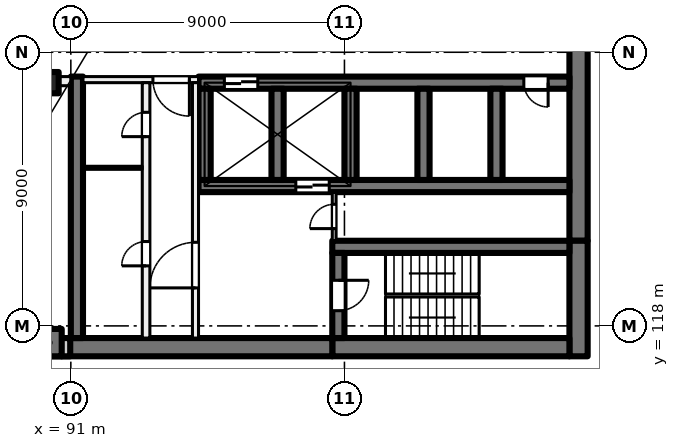
"""IFC4 building model, lengths in metres.
Left out: names, types, materials, properties, quantities, classifications, styles, units other than length and angle.
Written with IfcOpenShell. Run it as: python <this file> out.ifc"""

import sys

from ifc_helpers import new_model, si_unit, direction, frame, frame_2d, origin, origin_2d, place, context, subcontext, project, spatial, rectangle, extrude, element, fill, save


model = new_model("IFC4")
c1 = context("Model", 3, precision=1e-05, world=origin(), true_north=direction((0.0, 1.0)))
c2 = subcontext(c1, "Body", "Model", "MODEL_VIEW")
j1 = project(units=[si_unit("LENGTHUNIT", "METRE"), si_unit("PLANEANGLEUNIT", "RADIAN")], contexts=[c1])
p1 = place(None, origin())
s1 = spatial("IfcSite", under=j1, at=p1, CompositionType="ELEMENT")
p2 = place(p1, origin())
s2 = spatial("IfcBuilding", under=s1, at=p2, CompositionType="ELEMENT")
p3 = place(p2, frame((0.0, 0.0, 71.5)))
s3 = spatial("IfcBuildingStorey", under=s2, at=p3, CompositionType="ELEMENT", Elevation=71.5)
p4 = place(p3, frame((90.25, 126.0, 0.0), z_axis=(0.0, 0.0, 1.0), x_axis=(1.0, 0.0, 0.0)))
e1 = element("IfcColumn", 1, at=p4, inside=s3, PredefinedType="COLUMN", context=c2, shape_type="SweptSolid", body=[
    extrude(rectangle(XDim=0.7, YDim=0.7, at=origin_2d()), origin(), (0.0, 0.0, 1.0), 4.0),
])
p5 = place(p3, frame((90.25, 117.45, 0.0), z_axis=(0.0, 0.0, 1.0), x_axis=(1.0, 0.0, 0.0)))
e2 = element("IfcColumn", 2, at=p5, inside=s3, PredefinedType="COLUMN", context=c2, shape_type="SweptSolid", body=[
    extrude(rectangle(XDim=0.9, YDim=0.9, at=origin_2d()), origin(), (0.0, 0.0, 1.0), 4.0),
])
p6 = place(p3, frame((107.7, 135.2, 0.0), z_axis=(0.0, 0.0, 1.0), x_axis=(0.0, -1.0, 0.0)))
e3 = element("IfcWall", 3, at=p6, inside=s3, PredefinedType="SHEAR", context=c2, shape_type="SweptSolid", body=[
    extrude(rectangle(XDim=14.4, YDim=0.6, at=frame_2d((7.2, 0.0))), origin(), (0.0, 0.0, 1.0), 4.0),
])
p7 = place(p3, frame((107.7, 120.8, 0.0), z_axis=(0.0, 0.0, 1.0), x_axis=(0.0, -1.0, 0.0)))
e4 = element("IfcWall", 4, at=p7, inside=s3, PredefinedType="SHEAR", context=c2, shape_type="SweptSolid", body=[
    extrude(rectangle(XDim=3.8, YDim=0.6, at=frame_2d((1.9, 0.0))), origin(), (0.0, 0.0, 1.0), 4.0),
])
p8 = place(p3, frame((107.4, 117.3, 0.0), z_axis=(0.0, 0.0, 1.0), x_axis=(-1.0, 0.0, 0.0)))
e5 = element("IfcWall", 5, at=p8, inside=s3, PredefinedType="SHEAR", context=c2, shape_type="SweptSolid", body=[
    extrude(rectangle(XDim=7.8, YDim=0.6, at=frame_2d((3.9, 0.0))), origin(), (0.0, 0.0, 1.0), 4.0),
])
p9 = place(p3, frame((99.6, 117.3, 0.0), z_axis=(0.0, 0.0, 1.0), x_axis=(-1.0, 0.0, 0.0)))
e6 = element("IfcWall", 6, at=p9, inside=s3, PredefinedType="SHEAR", context=c2, shape_type="SweptSolid", body=[
    extrude(rectangle(XDim=8.9, YDim=0.6, at=frame_2d((4.45, 0.0))), origin(), (0.0, 0.0, 1.0), 4.0),
])
p10 = place(p3, frame((107.4, 120.6, 0.0), z_axis=(0.0, 0.0, 1.0), x_axis=(-1.0, 0.0, 0.0)))
e7 = element("IfcWall", 7, at=p10, inside=s3, PredefinedType="SHEAR", context=c2, shape_type="SweptSolid", body=[
    extrude(rectangle(XDim=7.8, YDim=0.4, at=frame_2d((3.9, 0.0))), origin(), (0.0, 0.0, 1.0), 4.0),
])
p11 = place(p3, frame((99.8, 120.4, 0.0), z_axis=(0.0, 0.0, 1.0), x_axis=(0.0, -1.0, 0.0)))
e8 = element("IfcWall", 8, at=p11, inside=s3, PredefinedType="SHEAR", context=c2, shape_type="SweptSolid", body=[
    extrude(rectangle(XDim=2.8, YDim=0.4, at=frame_2d((1.4, 0.0))), origin(), (0.0, 0.0, 1.0), 4.0),
])
p12 = place(p11, frame((0.9, 0.0, 0.0)))
e9 = element("IfcOpeningElement", 9, at=p12, cuts=e8, PredefinedType="OPENING", context=c2, shape_type="SweptSolid", body=[
    extrude(rectangle(XDim=1.0, YDim=2.1, at=frame_2d((0.5, 1.05))), frame((0.0, 0.21, 0.0), z_axis=(0.0, -1.0, 0.0), x_axis=(1.0, 0.0, 0.0)), (0.0, 0.0, 1.0), 0.42),
])
p13 = place(p3, frame((107.4, 126.0, 0.0), z_axis=(0.0, 0.0, 1.0), x_axis=(-1.0, 0.0, 0.0)))
e10 = element("IfcWall", 10, at=p13, inside=s3, PredefinedType="SHEAR", context=c2, shape_type="SweptSolid", body=[
    extrude(rectangle(XDim=12.2, YDim=0.4, at=frame_2d((6.1, 0.0))), origin(), (0.0, 0.0, 1.0), 4.0),
])
p14 = place(p13, frame((10.25, 0.0, 0.0)))
e11 = element("IfcOpeningElement", 11, at=p14, cuts=e10, PredefinedType="OPENING", context=c2, shape_type="SweptSolid", body=[
    extrude(rectangle(XDim=1.1, YDim=2.1, at=frame_2d((0.55, 1.05))), frame((0.0, 0.21, 0.0), z_axis=(0.0, -1.0, 0.0), x_axis=(1.0, 0.0, 0.0)), (0.0, 0.0, 1.0), 0.42),
])
p15 = place(p13, frame((0.7, 0.0, 0.0)))
e12 = element("IfcOpeningElement", 12, at=p15, cuts=e10, PredefinedType="OPENING", context=c2, shape_type="SweptSolid", body=[
    extrude(rectangle(XDim=0.8, YDim=2.1, at=frame_2d((0.4, 1.05))), frame((0.0, 0.21, 0.0), z_axis=(0.0, -1.0, 0.0), x_axis=(1.0, 0.0, 0.0)), (0.0, 0.0, 1.0), 0.42),
])
p16 = place(p3, frame((107.4, 122.6, 0.0), z_axis=(0.0, 0.0, 1.0), x_axis=(-1.0, 0.0, 0.0)))
e13 = element("IfcWall", 13, at=p16, inside=s3, PredefinedType="SHEAR", context=c2, shape_type="SweptSolid", body=[
    extrude(rectangle(XDim=12.2, YDim=0.4, at=frame_2d((6.1, 0.0))), origin(), (0.0, 0.0, 1.0), 4.0),
])
p17 = place(p16, frame((7.9, 0.0, 0.0)))
e14 = element("IfcOpeningElement", 14, at=p17, cuts=e13, PredefinedType="OPENING", context=c2, shape_type="SweptSolid", body=[
    extrude(rectangle(XDim=1.1, YDim=2.1, at=frame_2d((0.55, 1.05))), frame((0.0, 0.21, 0.0), z_axis=(0.0, -1.0, 0.0), x_axis=(1.0, 0.0, 0.0)), (0.0, 0.0, 1.0), 0.42),
])
for number, where, z_axis, x_axis in (
    (15, (105.0, 125.8, 0.0), (0.0, 0.0, 1.0), (0.0, -1.0, 0.0)),
    (16, (102.6, 125.8, 0.0), (0.0, 0.0, 1.0), (0.0, -1.0, 0.0)),
    (17, (100.2, 125.8, 0.0), (0.0, 0.0, 1.0), (0.0, -1.0, 0.0)),
    (18, (97.8, 125.8, 0.0), (0.0, 0.0, 1.0), (0.0, -1.0, 0.0)),
    (19, (95.4, 125.8, 0.0), (0.0, 0.0, 1.0), (0.0, -1.0, 0.0)),
):
    element("IfcWall", number, at=place(p3, frame(where, z_axis=z_axis, x_axis=x_axis)), inside=s3, PredefinedType="SHEAR", context=c2, shape_type="SweptSolid", body=[
        extrude(rectangle(XDim=3.0, YDim=0.4, at=frame_2d((1.5, 0.0))), origin(), (0.0, 0.0, 1.0), 4.0),
    ])
p18 = place(p3, frame((91.2, 126.2, 0.0), z_axis=(0.0, 0.0, 1.0), x_axis=(0.0, -1.0, 0.0)))
e20 = element("IfcWall", 20, at=p18, inside=s3, PredefinedType="SHEAR", context=c2, shape_type="SweptSolid", body=[
    extrude(rectangle(XDim=8.6, YDim=0.4, at=frame_2d((4.3, 0.0))), origin(), (0.0, 0.0, 1.0), 4.0),
])
p19 = place(p3, frame((90.98, 117.3, 0.0), z_axis=(0.0, 0.0, 1.0), x_axis=(-1.0, 0.0, 0.0)))
e21 = element("IfcWall", 21, at=p19, inside=s3, PredefinedType="SOLIDWALL", context=c2, shape_type="SweptSolid", body=[
    extrude(rectangle(XDim=33.745, YDim=0.6, at=frame_2d((16.873, 0.0))), origin(), (0.0, 0.0, 1.0), 3.625),
])
p20 = place(p19, frame((1.48, 0.0, 0.9)))
e22 = element("IfcOpeningElement", 22, at=p20, cuts=e21, PredefinedType="OPENING", context=c2, shape_type="SweptSolid", body=[
    extrude(rectangle(XDim=3.0, YDim=2.4, at=frame_2d((1.5, 1.2))), frame((0.0, 0.31, 0.0), z_axis=(0.0, -1.0, 0.0), x_axis=(1.0, 0.0, 0.0)), (0.0, 0.0, 1.0), 0.62),
])
p21 = place(p19, frame((5.98, 0.0, 0.9)))
e23 = element("IfcOpeningElement", 23, at=p21, cuts=e21, PredefinedType="OPENING", context=c2, shape_type="SweptSolid", body=[
    extrude(rectangle(XDim=3.0, YDim=2.4, at=frame_2d((1.5, 1.2))), frame((0.0, 0.31, 0.0), z_axis=(0.0, -1.0, 0.0), x_axis=(1.0, 0.0, 0.0)), (0.0, 0.0, 1.0), 0.62),
])
p22 = place(p19, frame((10.48, 0.0, 0.9)))
e24 = element("IfcOpeningElement", 24, at=p22, cuts=e21, PredefinedType="OPENING", context=c2, shape_type="SweptSolid", body=[
    extrude(rectangle(XDim=3.0, YDim=2.4, at=frame_2d((1.5, 1.2))), frame((0.0, 0.31, 0.0), z_axis=(0.0, -1.0, 0.0), x_axis=(1.0, 0.0, 0.0)), (0.0, 0.0, 1.0), 0.62),
])
p23 = place(p19, frame((14.98, 0.0, 0.9)))
e25 = element("IfcOpeningElement", 25, at=p23, cuts=e21, PredefinedType="OPENING", context=c2, shape_type="SweptSolid", body=[
    extrude(rectangle(XDim=3.0, YDim=2.4, at=frame_2d((1.5, 1.2))), frame((0.0, 0.31, 0.0), z_axis=(0.0, -1.0, 0.0), x_axis=(1.0, 0.0, 0.0)), (0.0, 0.0, 1.0), 0.62),
])
p24 = place(p19, frame((19.48, 0.0, 0.9)))
e26 = element("IfcOpeningElement", 26, at=p24, cuts=e21, PredefinedType="OPENING", context=c2, shape_type="SweptSolid", body=[
    extrude(rectangle(XDim=3.0, YDim=2.4, at=frame_2d((1.5, 1.2))), frame((0.0, 0.31, 0.0), z_axis=(0.0, -1.0, 0.0), x_axis=(1.0, 0.0, 0.0)), (0.0, 0.0, 1.0), 0.62),
])
p25 = place(p19, frame((23.98, 0.0, 0.9)))
e27 = element("IfcOpeningElement", 27, at=p25, cuts=e21, PredefinedType="OPENING", context=c2, shape_type="SweptSolid", body=[
    extrude(rectangle(XDim=3.0, YDim=2.4, at=frame_2d((1.5, 1.2))), frame((0.0, 0.31, 0.0), z_axis=(0.0, -1.0, 0.0), x_axis=(1.0, 0.0, 0.0)), (0.0, 0.0, 1.0), 0.62),
])
p26 = place(p19, frame((28.48, 0.0, 0.9)))
e28 = element("IfcOpeningElement", 28, at=p26, cuts=e21, PredefinedType="OPENING", context=c2, shape_type="SweptSolid", body=[
    extrude(rectangle(XDim=3.0, YDim=2.4, at=frame_2d((1.5, 1.2))), frame((0.0, 0.31, 0.0), z_axis=(0.0, -1.0, 0.0), x_axis=(1.0, 0.0, 0.0)), (0.0, 0.0, 1.0), 0.62),
])
p27 = place(p3, frame((95.2, 126.1, 0.0), z_axis=(0.0, 0.0, 1.0), x_axis=(-1.0, 0.0, 0.0)))
e29 = element("IfcWall", 29, at=p27, inside=s3, PredefinedType="PARTITIONING", context=c2, shape_type="SweptSolid", body=[
    extrude(rectangle(XDim=3.8, YDim=0.2, at=frame_2d((1.9, 0.0))), origin(), (0.0, 0.0, 1.0), 3.625),
])
p28 = place(p27, frame((0.3, 0.0, 0.0)))
e30 = element("IfcOpeningElement", 30, at=p28, cuts=e29, PredefinedType="OPENING", context=c2, shape_type="SweptSolid", body=[
    extrude(rectangle(XDim=1.2, YDim=2.1, at=frame_2d((0.6, 1.05))), frame((0.0, 0.11, 0.0), z_axis=(0.0, -1.0, 0.0), x_axis=(1.0, 0.0, 0.0)), (0.0, 0.0, 1.0), 0.22),
])
p29 = place(p3, frame((95.1, 117.6, 0.0), z_axis=(0.0, 0.0, 1.0), x_axis=(0.0, 1.0, 0.0)))
e31 = element("IfcWall", 31, at=p29, inside=s3, PredefinedType="PARTITIONING", context=c2, shape_type="SweptSolid", body=[
    extrude(rectangle(XDim=8.4, YDim=0.2, at=frame_2d((4.2, 0.0))), origin(), (0.0, 0.0, 1.0), 3.625),
])
p30 = place(p29, frame((1.65, 0.0, 0.0)))
e32 = element("IfcOpeningElement", 32, at=p30, cuts=e31, PredefinedType="OPENING", context=c2, shape_type="SweptSolid", body=[
    extrude(rectangle(XDim=1.5, YDim=2.1, at=frame_2d((0.75, 1.05))), frame((0.0, 0.11, 0.0), z_axis=(0.0, -1.0, 0.0), x_axis=(1.0, 0.0, 0.0)), (0.0, 0.0, 1.0), 0.22),
])
p31 = place(p3, frame((93.475, 117.6, 0.0), z_axis=(0.0, 0.0, 1.0), x_axis=(0.0, 1.0, 0.0)))
e33 = element("IfcWall", 33, at=p31, inside=s3, PredefinedType="PARTITIONING", context=c2, shape_type="SweptSolid", body=[
    extrude(rectangle(XDim=8.4, YDim=0.25, at=frame_2d((4.2, 0.0))), origin(), (0.0, 0.0, 1.0), 3.625),
])
p32 = place(p31, frame((6.625, 0.0, 0.0)))
e34 = element("IfcOpeningElement", 34, at=p32, cuts=e33, PredefinedType="OPENING", context=c2, shape_type="SweptSolid", body=[
    extrude(rectangle(XDim=0.8, YDim=2.1, at=frame_2d((0.4, 1.05))), frame((0.0, 0.135, 0.0), z_axis=(0.0, -1.0, 0.0), x_axis=(1.0, 0.0, 0.0)), (0.0, 0.0, 1.0), 0.27),
])
p33 = place(p31, frame((2.375, 0.0, 0.0)))
e35 = element("IfcOpeningElement", 35, at=p33, cuts=e33, PredefinedType="OPENING", context=c2, shape_type="SweptSolid", body=[
    extrude(rectangle(XDim=0.8, YDim=2.1, at=frame_2d((0.4, 1.05))), frame((0.0, 0.135, 0.0), z_axis=(0.0, -1.0, 0.0), x_axis=(1.0, 0.0, 0.0)), (0.0, 0.0, 1.0), 0.27),
])
p34 = place(p3, frame((99.663, 120.8, 0.0), z_axis=(0.0, 0.0, 1.0), x_axis=(0.0, 1.0, 0.0)))
e36 = element("IfcWall", 36, at=p34, inside=s3, PredefinedType="PARTITIONING", context=c2, shape_type="SweptSolid", body=[
    extrude(rectangle(XDim=1.6, YDim=0.125, at=frame_2d((0.8, 0.0))), origin(), (0.0, 0.0, 1.0), 3.625),
])
p35 = place(p34, frame((0.4, 0.0, 0.0)))
e37 = element("IfcOpeningElement", 37, at=p35, cuts=e36, PredefinedType="OPENING", context=c2, shape_type="SweptSolid", body=[
    extrude(rectangle(XDim=0.8, YDim=2.1, at=frame_2d((0.4, 1.05))), frame((0.0, 0.073, 0.0), z_axis=(0.0, -1.0, 0.0), x_axis=(1.0, 0.0, 0.0)), (0.0, 0.0, 1.0), 0.145),
])
p36 = place(p3, frame((93.35, 123.2, 0.0), z_axis=(0.0, 0.0, 1.0), x_axis=(-1.0, 0.0, 0.0)))
e38 = element("IfcWall", 38, at=p36, inside=s3, PredefinedType="PARTITIONING", context=c2, shape_type="SweptSolid", body=[
    extrude(rectangle(XDim=1.95, YDim=0.1, at=frame_2d((0.975, 0.0))), origin(), (0.0, 0.0, 1.0), 3.625),
])
p37 = place(p3, frame((91.0, 126.05, 0.0), z_axis=(0.0, 0.0, 1.0), x_axis=(-1.0, 0.0, 0.0)))
e39 = element("IfcWall", 39, at=p37, inside=s3, PredefinedType="PARTITIONING", context=c2, shape_type="SweptSolid", body=[
    extrude(rectangle(XDim=43.785, YDim=0.3, at=frame_2d((21.893, 0.0))), origin(), (0.0, 0.0, 1.0), 3.625),
])
p38 = place(p37, frame((2.025, 0.0, 0.0)))
e40 = element("IfcOpeningElement", 40, at=p38, cuts=e39, PredefinedType="OPENING", context=c2, shape_type="SweptSolid", body=[
    extrude(rectangle(XDim=1.2, YDim=2.1, at=frame_2d((0.6, 1.05))), frame((0.0, 0.16, 0.0), z_axis=(0.0, -1.0, 0.0), x_axis=(1.0, 0.0, 0.0)), (0.0, 0.0, 1.0), 0.32),
])
p39 = place(p37, frame((7.0, 0.0, 0.0)))
e41 = element("IfcOpeningElement", 41, at=p39, cuts=e39, PredefinedType="OPENING", context=c2, shape_type="SweptSolid", body=[
    extrude(rectangle(XDim=1.0, YDim=2.1, at=frame_2d((0.5, 1.05))), frame((0.0, 0.16, 0.0), z_axis=(0.0, -1.0, 0.0), x_axis=(1.0, 0.0, 0.0)), (0.0, 0.0, 1.0), 0.32),
])
p40 = place(p37, frame((11.5, 0.0, 0.0)))
e42 = element("IfcOpeningElement", 42, at=p40, cuts=e39, PredefinedType="OPENING", context=c2, shape_type="SweptSolid", body=[
    extrude(rectangle(XDim=1.0, YDim=2.1, at=frame_2d((0.5, 1.05))), frame((0.0, 0.16, 0.0), z_axis=(0.0, -1.0, 0.0), x_axis=(1.0, 0.0, 0.0)), (0.0, 0.0, 1.0), 0.32),
])
p41 = place(p37, frame((16.0, 0.0, 0.0)))
e43 = element("IfcOpeningElement", 43, at=p41, cuts=e39, PredefinedType="OPENING", context=c2, shape_type="SweptSolid", body=[
    extrude(rectangle(XDim=1.0, YDim=2.1, at=frame_2d((0.5, 1.05))), frame((0.0, 0.16, 0.0), z_axis=(0.0, -1.0, 0.0), x_axis=(1.0, 0.0, 0.0)), (0.0, 0.0, 1.0), 0.32),
])
p42 = place(p37, frame((20.5, 0.0, 0.0)))
e44 = element("IfcOpeningElement", 44, at=p42, cuts=e39, PredefinedType="OPENING", context=c2, shape_type="SweptSolid", body=[
    extrude(rectangle(XDim=1.0, YDim=2.1, at=frame_2d((0.5, 1.05))), frame((0.0, 0.16, 0.0), z_axis=(0.0, -1.0, 0.0), x_axis=(1.0, 0.0, 0.0)), (0.0, 0.0, 1.0), 0.32),
])
p43 = place(p37, frame((39.296, 0.0, 0.0)))
e45 = element("IfcOpeningElement", 45, at=p43, cuts=e39, PredefinedType="OPENING", context=c2, shape_type="SweptSolid", body=[
    extrude(rectangle(XDim=1.8, YDim=2.1, at=frame_2d((0.9, 1.05))), frame((0.0, 0.16, 0.0), z_axis=(0.0, -1.0, 0.0), x_axis=(1.0, 0.0, 0.0)), (0.0, 0.0, 1.0), 0.32),
])
p44 = place(p14, origin())
e46 = element("IfcDoor", 46, at=p44, inside=s3, OperationType="DOUBLE_DOOR_SLIDING", PredefinedType="DOOR", context=c2, shape_type="SweptSolid", body=[
    extrude(rectangle(XDim=1.1, YDim=2.1, at=frame_2d((0.55, 1.05))), frame((0.0, 0.025, 0.0), z_axis=(0.0, -1.0, 0.0), x_axis=(1.0, 0.0, 0.0)), (0.0, 0.0, 1.0), 0.05),
])
fill(e11, e46)
p45 = place(p15, origin())
e47 = element("IfcDoor", 47, at=p45, inside=s3, OperationType="SINGLE_SWING_LEFT", PredefinedType="DOOR", context=c2, shape_type="SweptSolid", body=[
    extrude(rectangle(XDim=0.8, YDim=2.1, at=frame_2d((0.4, 1.05))), frame((0.0, 0.025, 0.0), z_axis=(0.0, -1.0, 0.0), x_axis=(1.0, 0.0, 0.0)), (0.0, 0.0, 1.0), 0.05),
])
fill(e12, e47)
p46 = place(p28, origin())
e48 = element("IfcDoor", 48, at=p46, inside=s3, OperationType="DOUBLE_DOOR_SINGLE_SWING", PredefinedType="DOOR", context=c2, shape_type="SweptSolid", body=[
    extrude(rectangle(XDim=1.2, YDim=2.1, at=frame_2d((0.6, 1.05))), frame((0.0, 0.025, 0.0), z_axis=(0.0, -1.0, 0.0), x_axis=(1.0, 0.0, 0.0)), (0.0, 0.0, 1.0), 0.05),
])
fill(e30, e48)
p47 = place(p30, origin())
e49 = element("IfcDoor", 49, at=p47, inside=s3, OperationType="DOUBLE_DOOR_SINGLE_SWING", PredefinedType="DOOR", context=c2, shape_type="SweptSolid", body=[
    extrude(rectangle(XDim=1.5, YDim=2.1, at=frame_2d((0.75, 1.05))), frame((0.0, 0.025, 0.0), z_axis=(0.0, -1.0, 0.0), x_axis=(1.0, 0.0, 0.0)), (0.0, 0.0, 1.0), 0.05),
])
fill(e32, e49)
p48 = place(p12, origin())
e50 = element("IfcDoor", 50, at=p48, inside=s3, OperationType="SINGLE_SWING_LEFT", PredefinedType="DOOR", context=c2, shape_type="SweptSolid", body=[
    extrude(rectangle(XDim=1.0, YDim=2.1, at=frame_2d((0.5, 1.05))), frame((0.0, 0.025, 0.0), z_axis=(0.0, -1.0, 0.0), x_axis=(1.0, 0.0, 0.0)), (0.0, 0.0, 1.0), 0.05),
])
fill(e9, e50)
p49 = place(p35, origin())
e51 = element("IfcDoor", 51, at=p49, inside=s3, OperationType="SINGLE_SWING_RIGHT", PredefinedType="DOOR", context=c2, shape_type="SweptSolid", body=[
    extrude(rectangle(XDim=0.8, YDim=2.1, at=frame_2d((0.4, 1.05))), frame((0.0, 0.025, 0.0), z_axis=(0.0, -1.0, 0.0), x_axis=(1.0, 0.0, 0.0)), (0.0, 0.0, 1.0), 0.05),
])
fill(e37, e51)
p50 = place(p32, origin())
e52 = element("IfcDoor", 52, at=p50, inside=s3, OperationType="SINGLE_SWING_LEFT", PredefinedType="DOOR", context=c2, shape_type="SweptSolid", body=[
    extrude(rectangle(XDim=0.8, YDim=2.1, at=frame_2d((0.4, 1.05))), frame((0.0, 0.025, 0.0), z_axis=(0.0, -1.0, 0.0), x_axis=(1.0, 0.0, 0.0)), (0.0, 0.0, 1.0), 0.05),
])
fill(e34, e52)
p51 = place(p33, origin())
e53 = element("IfcDoor", 53, at=p51, inside=s3, OperationType="SINGLE_SWING_RIGHT", PredefinedType="DOOR", context=c2, shape_type="SweptSolid", body=[
    extrude(rectangle(XDim=0.8, YDim=2.1, at=frame_2d((0.4, 1.05))), frame((0.0, 0.025, 0.0), z_axis=(0.0, -1.0, 0.0), x_axis=(1.0, 0.0, 0.0)), (0.0, 0.0, 1.0), 0.05),
])
fill(e35, e53)
p52 = place(p17, origin())
e54 = element("IfcDoor", 54, at=p52, inside=s3, OperationType="DOUBLE_DOOR_SLIDING", PredefinedType="DOOR", context=c2, shape_type="SweptSolid", body=[
    extrude(rectangle(XDim=1.1, YDim=2.1, at=frame_2d((0.55, 1.05))), frame((0.0, 0.025, 0.0), z_axis=(0.0, -1.0, 0.0), x_axis=(1.0, 0.0, 0.0)), (0.0, 0.0, 1.0), 0.05),
])
fill(e14, e54)
save(model, sys.argv[1])
